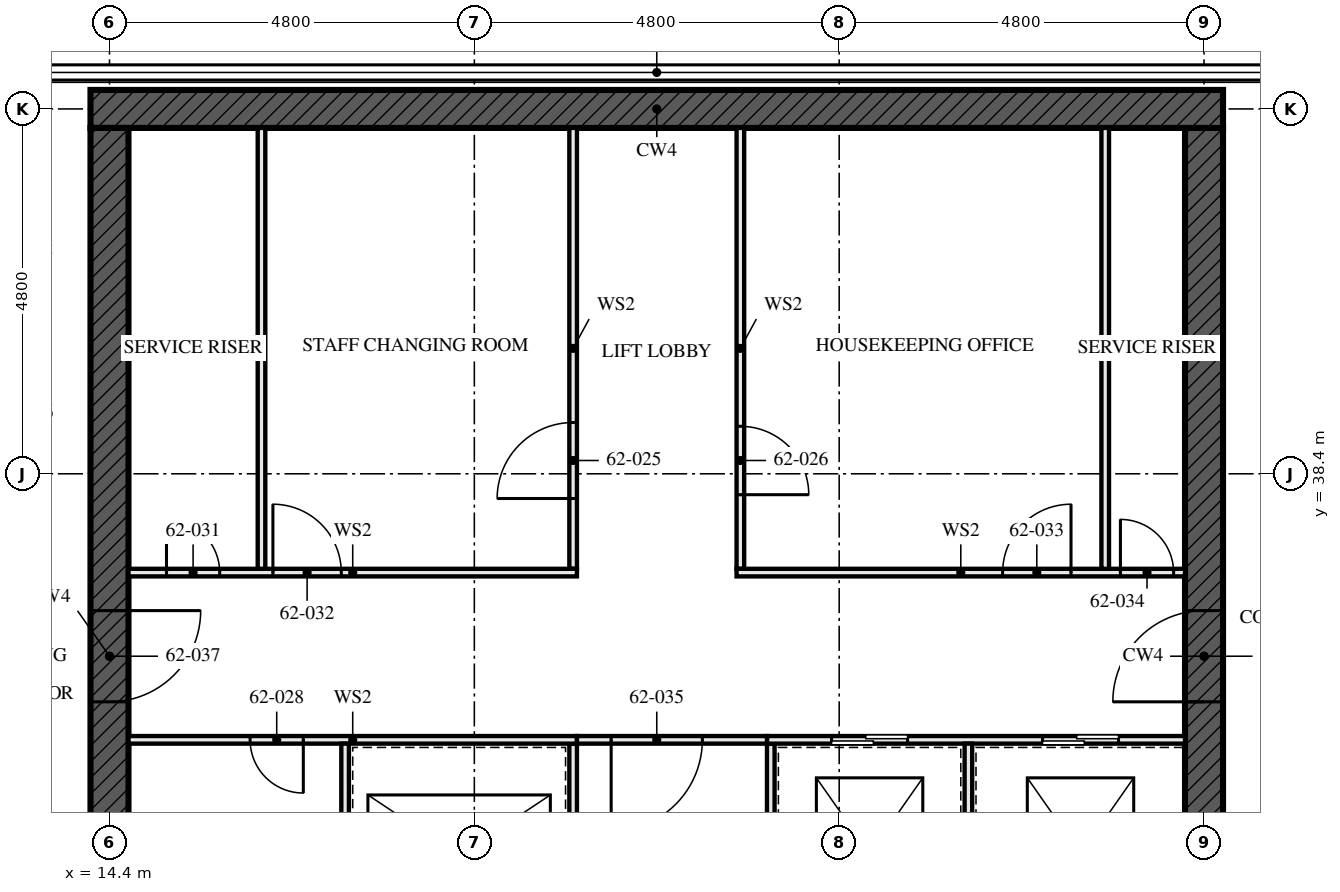
"""IFC4 building model, lengths in metres.
Left out: names, types, materials, properties, quantities, classifications, styles, units other than length and angle.
Written with IfcOpenShell. Run it as: python <this file> out.ifc"""

import sys

from ifc_helpers import new_model, si_unit, direction, frame, frame_2d, origin, place, context, subcontext, project, spatial, rectangle, extrude, element, fill, save


model = new_model("IFC4")
c1 = context("Model", 3, precision=1e-05, world=origin(), true_north=direction((0.0, 1.0)))
c2 = subcontext(c1, "Body", "Model", "MODEL_VIEW")
j1 = project(units=[si_unit("LENGTHUNIT", "METRE"), si_unit("PLANEANGLEUNIT", "RADIAN")], contexts=[c1])
p1 = place(None, origin())
s1 = spatial("IfcSite", under=j1, at=p1, CompositionType="ELEMENT")
p2 = place(p1, origin())
s2 = spatial("IfcBuilding", under=s1, at=p2, CompositionType="ELEMENT")
p3 = place(p2, frame((0.0, 0.0, 226.0)))
s3 = spatial("IfcBuildingStorey", under=s2, at=p3, CompositionType="ELEMENT", Elevation=226.0)
p4 = place(p3, frame((29.05, 43.2, -0.17), z_axis=(0.0, 0.0, 1.0), x_axis=(-1.0, 0.0, 0.0)))
e1 = element("IfcWall", 1, at=p4, inside=s3, PredefinedType="SHEAR", context=c2, shape_type="SweptSolid", body=[
    extrude(rectangle(XDim=14.9, YDim=0.5, at=frame_2d((7.45, 0.0))), origin(), (0.0, 0.0, 1.0), 3.5),
])
p5 = place(p3, frame((14.4, 42.95, -0.17), z_axis=(0.0, 0.0, 1.0), x_axis=(0.0, -1.0, 0.0)))
e2 = element("IfcWall", 2, at=p5, inside=s3, PredefinedType="SHEAR", context=c2, shape_type="SweptSolid", body=[
    extrude(rectangle(XDim=13.9, YDim=0.5, at=frame_2d((6.95, 0.0))), origin(), (0.0, 0.0, 1.0), 3.5),
])
p6 = place(p5, frame((6.35, 0.0, 0.17)))
e3 = element("IfcOpeningElement", 3, at=p6, cuts=e2, PredefinedType="OPENING", context=c2, shape_type="SweptSolid", body=[
    extrude(rectangle(XDim=1.2, YDim=2.1, at=frame_2d((0.6, 1.05))), frame((0.0, 0.26, 0.0), z_axis=(0.0, -1.0, 0.0), x_axis=(1.0, 0.0, 0.0)), (0.0, 0.0, 1.0), 0.521),
])
p7 = place(p3, frame((28.8, 29.05, -0.17), z_axis=(0.0, 0.0, 1.0), x_axis=(0.0, 1.0, 0.0)))
e4 = element("IfcWall", 4, at=p7, inside=s3, PredefinedType="SHEAR", context=c2, shape_type="SweptSolid", body=[
    extrude(rectangle(XDim=13.9, YDim=0.5, at=frame_2d((6.95, 0.0))), origin(), (0.0, 0.0, 1.0), 3.5),
])
p8 = place(p7, frame((6.35, 0.0, 0.17)))
e5 = element("IfcOpeningElement", 5, at=p8, cuts=e4, PredefinedType="OPENING", context=c2, shape_type="SweptSolid", body=[
    extrude(rectangle(XDim=1.2, YDim=2.1, at=frame_2d((0.6, 1.05))), frame((0.0, 0.26, 0.0), z_axis=(0.0, -1.0, 0.0), x_axis=(1.0, 0.0, 0.0)), (0.0, 0.0, 1.0), 0.521),
])
for number, where, z_axis, x_axis in (
    (6, (16.4, 37.15, 0.0), (0.0, 0.0, 1.0), (0.0, 1.0, 0.0)),
    (7, (27.5, 37.15, 0.0), (0.0, 0.0, 1.0), (0.0, 1.0, 0.0)),
):
    element("IfcWall", number, at=place(p3, frame(where, z_axis=z_axis, x_axis=x_axis)), inside=s3, PredefinedType="SOLIDWALL", context=c2, shape_type="SweptSolid", body=[
        extrude(rectangle(XDim=5.8, YDim=0.1, at=frame_2d((2.9, 0.0))), origin(), (0.0, 0.0, 1.0), 3.33),
    ])
p9 = place(p3, frame((20.5, 29.05, 0.0), z_axis=(0.0, 0.0, 1.0), x_axis=(0.0, 1.0, 0.0)))
e8 = element("IfcWall", 8, at=p9, inside=s3, PredefinedType="SOLIDWALL", context=c2, shape_type="SweptSolid", body=[
    extrude(rectangle(XDim=5.8, YDim=0.1, at=frame_2d((2.9, 0.0))), origin(), (0.0, 0.0, 1.0), 3.33),
])
p10 = place(p9, frame((0.8, 0.0, 0.0)))
e9 = element("IfcOpeningElement", 9, at=p10, cuts=e8, PredefinedType="OPENING", context=c2, shape_type="SweptSolid", body=[
    extrude(rectangle(XDim=1.1, YDim=2.3, at=frame_2d((0.55, 1.15))), frame((0.0, 0.061, 0.0), z_axis=(0.0, -1.0, 0.0), x_axis=(1.0, 0.0, 0.0)), (0.0, 0.0, 1.0), 0.121),
])
p11 = place(p9, frame((3.775, 0.0, 0.0)))
e10 = element("IfcOpeningElement", 10, at=p11, cuts=e8, PredefinedType="OPENING", context=c2, shape_type="SweptSolid", body=[
    extrude(rectangle(XDim=1.1, YDim=2.3, at=frame_2d((0.55, 1.15))), frame((0.0, 0.061, 0.0), z_axis=(0.0, -1.0, 0.0), x_axis=(1.0, 0.0, 0.0)), (0.0, 0.0, 1.0), 0.121),
])
p12 = place(p3, frame((20.5, 37.15, 0.0), z_axis=(0.0, 0.0, 1.0), x_axis=(0.0, 1.0, 0.0)))
e11 = element("IfcWall", 11, at=p12, inside=s3, PredefinedType="SOLIDWALL", context=c2, shape_type="SweptSolid", body=[
    extrude(rectangle(XDim=5.8, YDim=0.1, at=frame_2d((2.9, 0.0))), origin(), (0.0, 0.0, 1.0), 3.33),
])
p13 = place(p12, frame((0.925, 0.0, 0.0)))
e12 = element("IfcOpeningElement", 12, at=p13, cuts=e11, PredefinedType="OPENING", context=c2, shape_type="SweptSolid", body=[
    extrude(rectangle(XDim=1.0, YDim=2.1, at=frame_2d((0.5, 1.05))), frame((0.0, 0.061, 0.0), z_axis=(0.0, -1.0, 0.0), x_axis=(1.0, 0.0, 0.0)), (0.0, 0.0, 1.0), 0.121),
])
p14 = place(p3, frame((22.7, 37.15, 0.0), z_axis=(0.0, 0.0, 1.0), x_axis=(0.0, 1.0, 0.0)))
e13 = element("IfcWall", 13, at=p14, inside=s3, PredefinedType="SOLIDWALL", context=c2, shape_type="SweptSolid", body=[
    extrude(rectangle(XDim=5.8, YDim=0.1, at=frame_2d((2.9, 0.0))), origin(), (0.0, 0.0, 1.0), 3.33),
])
p15 = place(p14, frame((0.975, 0.0, 0.0)))
e14 = element("IfcOpeningElement", 14, at=p15, cuts=e13, PredefinedType="OPENING", context=c2, shape_type="SweptSolid", body=[
    extrude(rectangle(XDim=0.9, YDim=2.1, at=frame_2d((0.45, 1.05))), frame((0.0, 0.061, 0.0), z_axis=(0.0, -1.0, 0.0), x_axis=(1.0, 0.0, 0.0)), (0.0, 0.0, 1.0), 0.121),
])
p16 = place(p3, frame((23.1, 29.05, 0.0), z_axis=(0.0, 0.0, 1.0), x_axis=(0.0, 1.0, 0.0)))
e15 = element("IfcWall", 15, at=p16, inside=s3, PredefinedType="SOLIDWALL", context=c2, shape_type="SweptSolid", body=[
    extrude(rectangle(XDim=5.8, YDim=0.1, at=frame_2d((2.9, 0.0))), origin(), (0.0, 0.0, 1.0), 3.33),
])
p17 = place(p16, frame((1.0, 0.0, 0.0)))
e16 = element("IfcOpeningElement", 16, at=p17, cuts=e15, PredefinedType="OPENING", context=c2, shape_type="SweptSolid", body=[
    extrude(rectangle(XDim=0.7, YDim=2.1, at=frame_2d((0.35, 1.05))), frame((0.0, 0.061, 0.0), z_axis=(0.0, -1.0, 0.0), x_axis=(1.0, 0.0, 0.0)), (0.0, 0.0, 1.0), 0.121),
])
p18 = place(p3, frame((14.65, 34.9, 0.0), z_axis=(0.0, 0.0, 1.0), x_axis=(1.0, 0.0, 0.0)))
e17 = element("IfcWall", 17, at=p18, inside=s3, PredefinedType="SOLIDWALL", context=c2, shape_type="SweptSolid", body=[
    extrude(rectangle(XDim=5.9, YDim=0.1, at=frame_2d((2.95, 0.0))), origin(), (0.0, 0.0, 1.0), 3.33),
])
p19 = place(p18, frame((1.6, 0.0, 0.0)))
e18 = element("IfcOpeningElement", 18, at=p19, cuts=e17, PredefinedType="OPENING", context=c2, shape_type="SweptSolid", body=[
    extrude(rectangle(XDim=0.7, YDim=2.1, at=frame_2d((0.35, 1.05))), frame((0.0, 0.061, 0.0), z_axis=(0.0, -1.0, 0.0), x_axis=(1.0, 0.0, 0.0)), (0.0, 0.0, 1.0), 0.121),
])
p20 = place(p3, frame((23.05, 34.9, 0.0), z_axis=(0.0, 0.0, 1.0), x_axis=(1.0, 0.0, 0.0)))
e19 = element("IfcWall", 19, at=p20, inside=s3, PredefinedType="SOLIDWALL", context=c2, shape_type="SweptSolid", body=[
    extrude(rectangle(XDim=5.5, YDim=0.1, at=frame_2d((2.75, 0.0))), origin(), (0.0, 0.0, 1.0), 3.33),
])
p21 = place(p20, frame((0.85, 0.0, 0.0)))
e20 = element("IfcOpeningElement", 20, at=p21, cuts=e19, PredefinedType="OPENING", context=c2, shape_type="SweptSolid", body=[
    extrude(rectangle(XDim=1.0, YDim=2.1, at=frame_2d((0.5, 1.05))), frame((0.0, 0.061, 0.0), z_axis=(0.0, -1.0, 0.0), x_axis=(1.0, 0.0, 0.0)), (0.0, 0.0, 1.0), 0.121),
])
p22 = place(p20, frame((3.625, 0.0, 0.0)))
e21 = element("IfcOpeningElement", 21, at=p22, cuts=e19, PredefinedType="OPENING", context=c2, shape_type="SweptSolid", body=[
    extrude(rectangle(XDim=1.0, YDim=2.1, at=frame_2d((0.5, 1.05))), frame((0.0, 0.061, 0.0), z_axis=(0.0, -1.0, 0.0), x_axis=(1.0, 0.0, 0.0)), (0.0, 0.0, 1.0), 0.121),
])
p23 = place(p3, frame((14.65, 37.1, 0.0), z_axis=(0.0, 0.0, 1.0), x_axis=(1.0, 0.0, 0.0)))
e22 = element("IfcWall", 22, at=p23, inside=s3, PredefinedType="SOLIDWALL", context=c2, shape_type="SweptSolid", body=[
    extrude(rectangle(XDim=5.9, YDim=0.1, at=frame_2d((2.95, 0.0))), origin(), (0.0, 0.0, 1.0), 3.33),
])
p24 = place(p23, frame((0.5, 0.0, 0.0)))
e23 = element("IfcOpeningElement", 23, at=p24, cuts=e22, PredefinedType="OPENING", context=c2, shape_type="SweptSolid", body=[
    extrude(rectangle(XDim=0.7, YDim=2.1, at=frame_2d((0.35, 1.05))), frame((0.0, 0.061, 0.0), z_axis=(0.0, -1.0, 0.0), x_axis=(1.0, 0.0, 0.0)), (0.0, 0.0, 1.0), 0.121),
])
p25 = place(p23, frame((1.9, 0.0, 0.0)))
e24 = element("IfcOpeningElement", 24, at=p25, cuts=e22, PredefinedType="OPENING", context=c2, shape_type="SweptSolid", body=[
    extrude(rectangle(XDim=0.9, YDim=2.1, at=frame_2d((0.45, 1.05))), frame((0.0, 0.061, 0.0), z_axis=(0.0, -1.0, 0.0), x_axis=(1.0, 0.0, 0.0)), (0.0, 0.0, 1.0), 0.121),
])
p26 = place(p3, frame((22.65, 37.1, 0.0), z_axis=(0.0, 0.0, 1.0), x_axis=(1.0, 0.0, 0.0)))
e25 = element("IfcWall", 25, at=p26, inside=s3, PredefinedType="SOLIDWALL", context=c2, shape_type="SweptSolid", body=[
    extrude(rectangle(XDim=5.9, YDim=0.1, at=frame_2d((2.95, 0.0))), origin(), (0.0, 0.0, 1.0), 3.33),
])
p27 = place(p26, frame((3.5, 0.0, 0.0)))
e26 = element("IfcOpeningElement", 26, at=p27, cuts=e25, PredefinedType="OPENING", context=c2, shape_type="SweptSolid", body=[
    extrude(rectangle(XDim=0.9, YDim=2.1, at=frame_2d((0.45, 1.05))), frame((0.0, 0.061, 0.0), z_axis=(0.0, -1.0, 0.0), x_axis=(1.0, 0.0, 0.0)), (0.0, 0.0, 1.0), 0.121),
])
p28 = place(p26, frame((5.05, 0.0, 0.0)))
e27 = element("IfcOpeningElement", 27, at=p28, cuts=e25, PredefinedType="OPENING", context=c2, shape_type="SweptSolid", body=[
    extrude(rectangle(XDim=0.7, YDim=2.1, at=frame_2d((0.35, 1.05))), frame((0.0, 0.061, 0.0), z_axis=(0.0, -1.0, 0.0), x_axis=(1.0, 0.0, 0.0)), (0.0, 0.0, 1.0), 0.121),
])
p29 = place(p3, frame((20.55, 34.9, 0.0), z_axis=(0.0, 0.0, 1.0), x_axis=(1.0, 0.0, 0.0)))
e28 = element("IfcWall", 28, at=p29, inside=s3, PredefinedType="SOLIDWALL", context=c2, shape_type="SweptSolid", body=[
    extrude(rectangle(XDim=2.5, YDim=0.1, at=frame_2d((1.25, 0.0))), origin(), (0.0, 0.0, 1.0), 3.33),
])
p30 = place(p29, frame((0.45, 0.0, 0.0)))
e29 = element("IfcOpeningElement", 29, at=p30, cuts=e28, PredefinedType="OPENING", context=c2, shape_type="SweptSolid", body=[
    extrude(rectangle(XDim=1.2, YDim=2.1, at=frame_2d((0.6, 1.05))), frame((0.0, 0.061, 0.0), z_axis=(0.0, -1.0, 0.0), x_axis=(1.0, 0.0, 0.0)), (0.0, 0.0, 1.0), 0.121),
])
p31 = place(p3, frame((17.5, 29.05, 0.0), z_axis=(0.0, 0.0, 1.0), x_axis=(0.0, 1.0, 0.0)))
e30 = element("IfcWall", 30, at=p31, inside=s3, PredefinedType="SOLIDWALL", context=c2, shape_type="SweptSolid", body=[
    extrude(rectangle(XDim=5.8, YDim=0.1, at=frame_2d((2.9, 0.0))), origin(), (0.0, 0.0, 1.0), 3.33),
])
p32 = place(p3, frame((25.7, 31.95, 0.0), z_axis=(0.0, 0.0, 1.0), x_axis=(0.0, 1.0, 0.0)))
e31 = element("IfcWall", 31, at=p32, inside=s3, PredefinedType="SOLIDWALL", context=c2, shape_type="SweptSolid", body=[
    extrude(rectangle(XDim=2.9, YDim=0.1, at=frame_2d((1.45, 0.0))), origin(), (0.0, 0.0, 1.0), 3.33),
])
p33 = place(p13, origin())
e32 = element("IfcDoor", 32, at=p33, inside=s3, OperationType="SINGLE_SWING_RIGHT", PredefinedType="DOOR", context=c2, shape_type="SweptSolid", body=[
    extrude(rectangle(XDim=1.0, YDim=2.1, at=frame_2d((0.5, 1.05))), frame((0.0, 0.027, 0.0), z_axis=(0.0, -1.0, 0.0), x_axis=(1.0, 0.0, 0.0)), (0.0, 0.0, 1.0), 0.054),
])
fill(e12, e32)
p34 = place(p15, frame((0.9, 0.0, 0.0), z_axis=(0.0, 0.0, 1.0), x_axis=(-1.0, 0.0, 0.0)))
e33 = element("IfcDoor", 33, at=p34, inside=s3, OperationType="SINGLE_SWING_LEFT", PredefinedType="DOOR", context=c2, shape_type="SweptSolid", body=[
    extrude(rectangle(XDim=0.9, YDim=2.1, at=frame_2d((0.45, 1.05))), frame((0.0, 0.027, 0.0), z_axis=(0.0, -1.0, 0.0), x_axis=(1.0, 0.0, 0.0)), (0.0, 0.0, 1.0), 0.054),
])
fill(e14, e33)
p35 = place(p19, frame((0.7, 0.0, 0.0), z_axis=(0.0, 0.0, 1.0), x_axis=(-1.0, 0.0, 0.0)))
e34 = element("IfcDoor", 34, at=p35, inside=s3, OperationType="SINGLE_SWING_RIGHT", PredefinedType="DOOR", context=c2, shape_type="SweptSolid", body=[
    extrude(rectangle(XDim=0.7, YDim=2.1, at=frame_2d((0.35, 1.05))), frame((0.0, 0.027, 0.0), z_axis=(0.0, -1.0, 0.0), x_axis=(1.0, 0.0, 0.0)), (0.0, 0.0, 1.0), 0.054),
])
fill(e18, e34)
p36 = place(p21, origin())
e35 = element("IfcDoor", 35, at=p36, inside=s3, OperationType="SLIDING_TO_LEFT", PredefinedType="DOOR", context=c2, shape_type="SweptSolid", body=[
    extrude(rectangle(XDim=1.0, YDim=2.1, at=frame_2d((0.5, 1.05))), frame((0.0, 0.05, 0.0), z_axis=(0.0, -1.0, 0.0), x_axis=(1.0, 0.0, 0.0)), (0.0, 0.0, 1.0), 0.1),
])
fill(e20, e35)
p37 = place(p22, origin())
e36 = element("IfcDoor", 36, at=p37, inside=s3, OperationType="SLIDING_TO_LEFT", PredefinedType="DOOR", context=c2, shape_type="SweptSolid", body=[
    extrude(rectangle(XDim=1.0, YDim=2.1, at=frame_2d((0.5, 1.05))), frame((0.0, 0.05, 0.0), z_axis=(0.0, -1.0, 0.0), x_axis=(1.0, 0.0, 0.0)), (0.0, 0.0, 1.0), 0.1),
])
fill(e21, e36)
p38 = place(p24, origin())
e37 = element("IfcDoor", 37, at=p38, inside=s3, OperationType="SINGLE_SWING_RIGHT", PredefinedType="DOOR", context=c2, shape_type="SweptSolid", body=[
    extrude(rectangle(XDim=0.7, YDim=2.1, at=frame_2d((0.35, 1.05))), frame((0.0, 0.027, 0.0), z_axis=(0.0, -1.0, 0.0), x_axis=(1.0, 0.0, 0.0)), (0.0, 0.0, 1.0), 0.054),
])
fill(e23, e37)
p39 = place(p25, origin())
e38 = element("IfcDoor", 38, at=p39, inside=s3, OperationType="SINGLE_SWING_RIGHT", PredefinedType="DOOR", context=c2, shape_type="SweptSolid", body=[
    extrude(rectangle(XDim=0.9, YDim=2.1, at=frame_2d((0.45, 1.05))), frame((0.0, 0.027, 0.0), z_axis=(0.0, -1.0, 0.0), x_axis=(1.0, 0.0, 0.0)), (0.0, 0.0, 1.0), 0.054),
])
fill(e24, e38)
p40 = place(p27, origin())
e39 = element("IfcDoor", 39, at=p40, inside=s3, OperationType="SINGLE_SWING_LEFT", PredefinedType="DOOR", context=c2, shape_type="SweptSolid", body=[
    extrude(rectangle(XDim=0.9, YDim=2.1, at=frame_2d((0.45, 1.05))), frame((0.0, 0.027, 0.0), z_axis=(0.0, -1.0, 0.0), x_axis=(1.0, 0.0, 0.0)), (0.0, 0.0, 1.0), 0.054),
])
fill(e26, e39)
p41 = place(p28, origin())
e40 = element("IfcDoor", 40, at=p41, inside=s3, OperationType="SINGLE_SWING_RIGHT", PredefinedType="DOOR", context=c2, shape_type="SweptSolid", body=[
    extrude(rectangle(XDim=0.7, YDim=2.1, at=frame_2d((0.35, 1.05))), frame((0.0, 0.027, 0.0), z_axis=(0.0, -1.0, 0.0), x_axis=(1.0, 0.0, 0.0)), (0.0, 0.0, 1.0), 0.054),
])
fill(e27, e40)
p42 = place(p30, frame((1.2, 0.0, 0.0), z_axis=(0.0, 0.0, 1.0), x_axis=(-1.0, 0.0, 0.0)))
e41 = element("IfcDoor", 41, at=p42, inside=s3, OperationType="SINGLE_SWING_LEFT", PredefinedType="DOOR", context=c2, shape_type="SweptSolid", body=[
    extrude(rectangle(XDim=1.2, YDim=2.1, at=frame_2d((0.6, 1.05))), frame((0.0, 0.027, 0.0), z_axis=(0.0, -1.0, 0.0), x_axis=(1.0, 0.0, 0.0)), (0.0, 0.0, 1.0), 0.054),
])
fill(e29, e41)
p43 = place(p6, origin())
e42 = element("IfcDoor", 42, at=p43, inside=s3, OperationType="SINGLE_SWING_LEFT", PredefinedType="DOOR", context=c2, shape_type="SweptSolid", body=[
    extrude(rectangle(XDim=1.2, YDim=2.1, at=frame_2d((0.6, 1.05))), frame((0.0, 0.027, 0.0), z_axis=(0.0, -1.0, 0.0), x_axis=(1.0, 0.0, 0.0)), (0.0, 0.0, 1.0), 0.054),
])
fill(e3, e42)
p44 = place(p8, origin())
e43 = element("IfcDoor", 43, at=p44, inside=s3, OperationType="SINGLE_SWING_LEFT", PredefinedType="DOOR", context=c2, shape_type="SweptSolid", body=[
    extrude(rectangle(XDim=1.2, YDim=2.1, at=frame_2d((0.6, 1.05))), frame((0.0, 0.027, 0.0), z_axis=(0.0, -1.0, 0.0), x_axis=(1.0, 0.0, 0.0)), (0.0, 0.0, 1.0), 0.054),
])
fill(e5, e43)
save(model, sys.argv[1])
